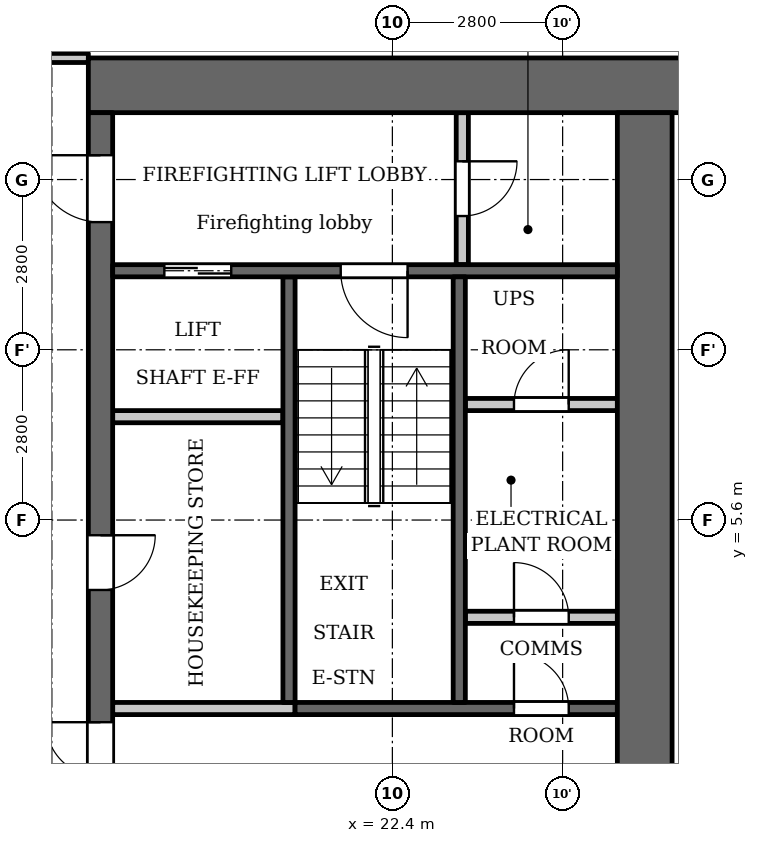
"""IFC4 building model, lengths in metres.
Left out: names, types, materials, properties, quantities, classifications, styles, units other than length and angle.
Written with IfcOpenShell. Run it as: python <this file> out.ifc"""

import sys

from ifc_helpers import new_model, si_unit, direction, frame, frame_2d, origin, place, context, subcontext, project, spatial, rectangle, extrude, element, fill, save


model = new_model("IFC4")
c1 = context("Model", 3, precision=1e-05, world=origin(), true_north=direction((0.0, 1.0)))
c2 = subcontext(c1, "Body", "Model", "MODEL_VIEW")
j1 = project(units=[si_unit("LENGTHUNIT", "METRE"), si_unit("PLANEANGLEUNIT", "RADIAN")], contexts=[c1])
p1 = place(None, origin())
s1 = spatial("IfcSite", under=j1, at=p1, CompositionType="ELEMENT")
p2 = place(p1, origin())
s2 = spatial("IfcBuilding", under=s1, at=p2, CompositionType="ELEMENT")
p3 = place(p2, frame((0.0, 0.0, 111.3)))
s3 = spatial("IfcBuildingStorey", under=s2, at=p3, CompositionType="ELEMENT", Elevation=111.3)
p4 = place(p3, frame((20.7, 2.6, 0.0), z_axis=(0.0, 0.0, 1.0), x_axis=(0.0, 1.0, 0.0)))
e1 = element("IfcWall", 1, at=p4, inside=s3, PredefinedType="SHEAR", context=c2, shape_type="SweptSolid", body=[
    extrude(rectangle(XDim=7.0, YDim=0.2, at=frame_2d((3.5, 0.0))), origin(), (0.0, 0.0, 1.0), 3.2),
])
p5 = place(p3, frame((20.8, 2.5, 0.0), z_axis=(0.0, 0.0, 1.0), x_axis=(1.0, 0.0, 0.0)))
e2 = element("IfcWall", 2, at=p5, inside=s3, PredefinedType="SHEAR", context=c2, shape_type="SweptSolid", body=[
    extrude(rectangle(XDim=5.3, YDim=0.2, at=frame_2d((2.65, 0.0))), origin(), (0.0, 0.0, 1.0), 3.2),
])
p6 = place(p5, frame((3.6, 0.0, 0.0)))
e3 = element("IfcOpeningElement", 3, at=p6, cuts=e2, PredefinedType="OPENING", context=c2, shape_type="SweptSolid", body=[
    extrude(rectangle(XDim=0.9, YDim=2.1, at=frame_2d((0.45, 1.05))), frame((0.0, 0.11, 0.0), z_axis=(0.0, -1.0, 0.0), x_axis=(1.0, 0.0, 0.0)), (0.0, 0.0, 1.0), 0.22),
])
p7 = place(p3, frame((17.4, 12.75, 0.0), z_axis=(0.0, 0.0, 1.0), x_axis=(1.0, 0.0, 0.0)))
e4 = element("IfcWall", 4, at=p7, inside=s3, PredefinedType="SHEAR", context=c2, shape_type="SweptSolid", body=[
    extrude(rectangle(XDim=10.4, YDim=0.9, at=frame_2d((5.2, 0.0))), origin(), (0.0, 0.0, 1.0), 3.2),
])
p8 = place(p3, frame((17.6, -12.3, 0.0), z_axis=(0.0, 0.0, 1.0), x_axis=(0.0, 1.0, 0.0)))
e5 = element("IfcWall", 5, at=p8, inside=s3, PredefinedType="SHEAR", context=c2, shape_type="SweptSolid", body=[
    extrude(rectangle(XDim=24.6, YDim=0.4, at=frame_2d((12.3, 0.0))), origin(), (0.0, 0.0, 1.0), 3.2),
])
p9 = place(p8, frame((6.0, 0.0, 0.0)))
e6 = element("IfcOpeningElement", 6, at=p9, cuts=e5, PredefinedType="OPENING", context=c2, shape_type="SweptSolid", body=[
    extrude(rectangle(XDim=1.1, YDim=2.1, at=frame_2d((0.55, 1.05))), frame((0.0, 0.21, 0.0), z_axis=(0.0, -1.0, 0.0), x_axis=(1.0, 0.0, 0.0)), (0.0, 0.0, 1.0), 0.42),
])
p10 = place(p8, frame((8.4, 0.0, 0.0)))
e7 = element("IfcOpeningElement", 7, at=p10, cuts=e5, PredefinedType="OPENING", context=c2, shape_type="SweptSolid", body=[
    extrude(rectangle(XDim=1.1, YDim=2.1, at=frame_2d((0.55, 1.05))), frame((0.0, 0.21, 0.0), z_axis=(0.0, -1.0, 0.0), x_axis=(1.0, 0.0, 0.0)), (0.0, 0.0, 1.0), 0.42),
])
p11 = place(p8, frame((10.8, 0.0, 0.0)))
e8 = element("IfcOpeningElement", 8, at=p11, cuts=e5, PredefinedType="OPENING", context=c2, shape_type="SweptSolid", body=[
    extrude(rectangle(XDim=1.1, YDim=2.1, at=frame_2d((0.55, 1.05))), frame((0.0, 0.21, 0.0), z_axis=(0.0, -1.0, 0.0), x_axis=(1.0, 0.0, 0.0)), (0.0, 0.0, 1.0), 0.42),
])
p12 = place(p8, frame((16.75, 0.0, 0.0)))
e9 = element("IfcOpeningElement", 9, at=p12, cuts=e5, PredefinedType="OPENING", context=c2, shape_type="SweptSolid", body=[
    extrude(rectangle(XDim=0.9, YDim=2.1, at=frame_2d((0.45, 1.05))), frame((0.0, 0.21, 0.0), z_axis=(0.0, -1.0, 0.0), x_axis=(1.0, 0.0, 0.0)), (0.0, 0.0, 1.0), 0.42),
])
p13 = place(p8, frame((22.8, 0.0, 0.0)))
e10 = element("IfcOpeningElement", 10, at=p13, cuts=e5, PredefinedType="OPENING", context=c2, shape_type="SweptSolid", body=[
    extrude(rectangle(XDim=1.1, YDim=2.1, at=frame_2d((0.55, 1.05))), frame((0.0, 0.21, 0.0), z_axis=(0.0, -1.0, 0.0), x_axis=(1.0, 0.0, 0.0)), (0.0, 0.0, 1.0), 0.42),
])
p14 = place(p8, frame((0.7, 0.0, 0.0)))
e11 = element("IfcOpeningElement", 11, at=p14, cuts=e5, PredefinedType="OPENING", context=c2, shape_type="SweptSolid", body=[
    extrude(rectangle(XDim=1.1, YDim=2.1, at=frame_2d((0.55, 1.05))), frame((0.0, 0.21, 0.0), z_axis=(0.0, -1.0, 0.0), x_axis=(1.0, 0.0, 0.0)), (0.0, 0.0, 1.0), 0.42),
])
p15 = place(p8, frame((12.775, 0.0, 0.0)))
e12 = element("IfcOpeningElement", 12, at=p15, cuts=e5, PredefinedType="OPENING", context=c2, shape_type="SweptSolid", body=[
    extrude(rectangle(XDim=1.8, YDim=2.1, at=frame_2d((0.9, 1.05))), frame((0.0, 0.21, 0.0), z_axis=(0.0, -1.0, 0.0), x_axis=(1.0, 0.0, 0.0)), (0.0, 0.0, 1.0), 0.42),
])
p16 = place(p3, frame((26.55, -12.3, 0.0), z_axis=(0.0, 0.0, 1.0), x_axis=(0.0, 1.0, 0.0)))
e13 = element("IfcWall", 13, at=p16, inside=s3, PredefinedType="SHEAR", context=c2, shape_type="SweptSolid", body=[
    extrude(rectangle(XDim=24.6, YDim=0.9, at=frame_2d((12.3, 0.0))), origin(), (0.0, 0.0, 1.0), 3.2),
])
p17 = place(p3, frame((23.55, 9.8, 0.0), z_axis=(0.0, 0.0, 1.0), x_axis=(0.0, 1.0, 0.0)))
e14 = element("IfcWall", 14, at=p17, inside=s3, PredefinedType="PARTITIONING", context=c2, shape_type="SweptSolid", body=[
    extrude(rectangle(XDim=2.5, YDim=0.2, at=frame_2d((1.25, 0.0))), origin(), (0.0, 0.0, 1.0), 3.2),
])
p18 = place(p17, frame((0.8, 0.0, 0.0)))
e15 = element("IfcOpeningElement", 15, at=p18, cuts=e14, PredefinedType="OPENING", context=c2, shape_type="SweptSolid", body=[
    extrude(rectangle(XDim=0.9, YDim=2.1, at=frame_2d((0.45, 1.05))), frame((0.0, 0.11, 0.0), z_axis=(0.0, -1.0, 0.0), x_axis=(1.0, 0.0, 0.0)), (0.0, 0.0, 1.0), 0.22),
])
p19 = place(p3, frame((23.6, 4.0, 0.0), z_axis=(0.0, 0.0, 1.0), x_axis=(1.0, 0.0, 0.0)))
e16 = element("IfcWall", 16, at=p19, inside=s3, PredefinedType="PARTITIONING", context=c2, shape_type="SweptSolid", body=[
    extrude(rectangle(XDim=2.5, YDim=0.2, at=frame_2d((1.25, 0.0))), origin(), (0.0, 0.0, 1.0), 3.2),
])
p20 = place(p19, frame((0.8, 0.0, 0.0)))
e17 = element("IfcOpeningElement", 17, at=p20, cuts=e16, PredefinedType="OPENING", context=c2, shape_type="SweptSolid", body=[
    extrude(rectangle(XDim=0.9, YDim=2.1, at=frame_2d((0.45, 1.05))), frame((0.0, 0.11, 0.0), z_axis=(0.0, -1.0, 0.0), x_axis=(1.0, 0.0, 0.0)), (0.0, 0.0, 1.0), 0.22),
])
p21 = place(p3, frame((23.6, 7.5, 0.0), z_axis=(0.0, 0.0, 1.0), x_axis=(1.0, 0.0, 0.0)))
e18 = element("IfcWall", 18, at=p21, inside=s3, PredefinedType="PARTITIONING", context=c2, shape_type="SweptSolid", body=[
    extrude(rectangle(XDim=2.5, YDim=0.2, at=frame_2d((1.25, 0.0))), origin(), (0.0, 0.0, 1.0), 3.2),
])
p22 = place(p21, frame((0.8, 0.0, 0.0)))
e19 = element("IfcOpeningElement", 19, at=p22, cuts=e18, PredefinedType="OPENING", context=c2, shape_type="SweptSolid", body=[
    extrude(rectangle(XDim=0.9, YDim=2.1, at=frame_2d((0.45, 1.05))), frame((0.0, 0.11, 0.0), z_axis=(0.0, -1.0, 0.0), x_axis=(1.0, 0.0, 0.0)), (0.0, 0.0, 1.0), 0.22),
])
p23 = place(p3, frame((17.8, 2.5, 0.0), z_axis=(0.0, 0.0, 1.0), x_axis=(1.0, 0.0, 0.0)))
e20 = element("IfcWall", 20, at=p23, inside=s3, PredefinedType="PARTITIONING", context=c2, shape_type="SweptSolid", body=[
    extrude(rectangle(XDim=3.0, YDim=0.2, at=frame_2d((1.5, 0.0))), origin(), (0.0, 0.0, 1.0), 3.2),
])
p24 = place(p3, frame((17.8, 7.3, 0.0), z_axis=(0.0, 0.0, 1.0), x_axis=(1.0, 0.0, 0.0)))
e21 = element("IfcWall", 21, at=p24, inside=s3, PredefinedType="PARTITIONING", context=c2, shape_type="SweptSolid", body=[
    extrude(rectangle(XDim=2.8, YDim=0.2, at=frame_2d((1.4, 0.0))), origin(), (0.0, 0.0, 1.0), 3.2),
])
p25 = place(p3, frame((17.8, 9.7, 0.0), z_axis=(0.0, 0.0, 1.0), x_axis=(1.0, 0.0, 0.0)))
e22 = element("IfcWall", 22, at=p25, inside=s3, PredefinedType="SHEAR", context=c2, shape_type="SweptSolid", body=[
    extrude(rectangle(XDim=8.3, YDim=0.2, at=frame_2d((4.15, 0.0))), origin(), (0.0, 0.0, 1.0), 3.2),
])
p26 = place(p25, frame((0.85, 0.0, 0.0)))
e23 = element("IfcOpeningElement", 23, at=p26, cuts=e22, PredefinedType="OPENING", context=c2, shape_type="SweptSolid", body=[
    extrude(rectangle(XDim=1.1, YDim=2.1, at=frame_2d((0.55, 1.05))), frame((0.0, 0.11, 0.0), z_axis=(0.0, -1.0, 0.0), x_axis=(1.0, 0.0, 0.0)), (0.0, 0.0, 1.0), 0.22),
])
p27 = place(p25, frame((3.75, 0.0, 0.0)))
e24 = element("IfcOpeningElement", 24, at=p27, cuts=e22, PredefinedType="OPENING", context=c2, shape_type="SweptSolid", body=[
    extrude(rectangle(XDim=1.1, YDim=2.1, at=frame_2d((0.55, 1.05))), frame((0.0, 0.11, 0.0), z_axis=(0.0, -1.0, 0.0), x_axis=(1.0, 0.0, 0.0)), (0.0, 0.0, 1.0), 0.22),
])
p28 = place(p3, frame((23.5, 2.6, 0.0), z_axis=(0.0, 0.0, 1.0), x_axis=(0.0, 1.0, 0.0)))
e25 = element("IfcWall", 25, at=p28, inside=s3, PredefinedType="SHEAR", context=c2, shape_type="SweptSolid", body=[
    extrude(rectangle(XDim=7.0, YDim=0.2, at=frame_2d((3.5, 0.0))), origin(), (0.0, 0.0, 1.0), 3.2),
])
p29 = place(p3, frame((-17.4, 13.2, 0.0), z_axis=(0.0, 0.0, 1.0), x_axis=(1.0, 0.0, 0.0)))
e26 = element("IfcWall", 26, at=p29, inside=s3, PredefinedType="PARTITIONING", context=c2, shape_type="SweptSolid", body=[
    extrude(rectangle(XDim=34.8, YDim=0.15, at=frame_2d((17.4, 0.0))), origin(), (0.0, 0.0, 1.0), 3.2),
])
p30 = place(p29, frame((0.75, 0.0, 0.0)))
e27 = element("IfcOpeningElement", 27, at=p30, cuts=e26, PredefinedType="OPENING", context=c2, shape_type="SweptSolid", body=[
    extrude(rectangle(XDim=1.0, YDim=2.1, at=frame_2d((0.5, 1.05))), frame((0.0, 0.085, 0.0), z_axis=(0.0, -1.0, 0.0), x_axis=(1.0, 0.0, 0.0)), (0.0, 0.0, 1.0), 0.17),
])
p31 = place(p29, frame((33.15, 0.0, 0.0)))
e28 = element("IfcOpeningElement", 28, at=p31, cuts=e26, PredefinedType="OPENING", context=c2, shape_type="SweptSolid", body=[
    extrude(rectangle(XDim=1.0, YDim=2.1, at=frame_2d((0.5, 1.05))), frame((0.0, 0.085, 0.0), z_axis=(0.0, -1.0, 0.0), x_axis=(1.0, 0.0, 0.0)), (0.0, 0.0, 1.0), 0.17),
])
p32 = place(p29, frame((6.85, 0.0, 0.0)))
e29 = element("IfcOpeningElement", 29, at=p32, cuts=e26, PredefinedType="OPENING", context=c2, shape_type="SweptSolid", body=[
    extrude(rectangle(XDim=1.0, YDim=2.1, at=frame_2d((0.5, 1.05))), frame((0.0, 0.085, 0.0), z_axis=(0.0, -1.0, 0.0), x_axis=(1.0, 0.0, 0.0)), (0.0, 0.0, 1.0), 0.17),
])
p33 = place(p29, frame((12.45, 0.0, 0.0)))
e30 = element("IfcOpeningElement", 30, at=p33, cuts=e26, PredefinedType="OPENING", context=c2, shape_type="SweptSolid", body=[
    extrude(rectangle(XDim=1.0, YDim=2.1, at=frame_2d((0.5, 1.05))), frame((0.0, 0.085, 0.0), z_axis=(0.0, -1.0, 0.0), x_axis=(1.0, 0.0, 0.0)), (0.0, 0.0, 1.0), 0.17),
])
p34 = place(p29, frame((29.25, 0.0, 0.0)))
e31 = element("IfcOpeningElement", 31, at=p34, cuts=e26, PredefinedType="OPENING", context=c2, shape_type="SweptSolid", body=[
    extrude(rectangle(XDim=1.0, YDim=2.1, at=frame_2d((0.5, 1.05))), frame((0.0, 0.085, 0.0), z_axis=(0.0, -1.0, 0.0), x_axis=(1.0, 0.0, 0.0)), (0.0, 0.0, 1.0), 0.17),
])
p35 = place(p12, origin())
e32 = element("IfcDoor", 32, at=p35, inside=s3, OperationType="SINGLE_SWING_RIGHT", PredefinedType="DOOR", context=c2, shape_type="SweptSolid", body=[
    extrude(rectangle(XDim=0.9, YDim=2.1, at=frame_2d((0.45, 1.05))), frame((0.0, 0.025, 0.0), z_axis=(0.0, -1.0, 0.0), x_axis=(1.0, 0.0, 0.0)), (0.0, 0.0, 1.0), 0.05),
])
fill(e9, e32)
p36 = place(p26, origin())
e33 = element("IfcDoor", 33, at=p36, inside=s3, OperationType="DOUBLE_DOOR_SLIDING", PredefinedType="DOOR", context=c2, shape_type="SweptSolid", body=[
    extrude(rectangle(XDim=1.1, YDim=2.1, at=frame_2d((0.55, 1.05))), frame((0.0, 0.025, 0.0), z_axis=(0.0, -1.0, 0.0), x_axis=(1.0, 0.0, 0.0)), (0.0, 0.0, 1.0), 0.05),
])
fill(e23, e33)
p37 = place(p13, origin())
e34 = element("IfcDoor", 34, at=p37, inside=s3, OperationType="SINGLE_SWING_LEFT", PredefinedType="DOOR", context=c2, shape_type="SweptSolid", body=[
    extrude(rectangle(XDim=1.1, YDim=2.1, at=frame_2d((0.55, 1.05))), frame((0.0, 0.025, 0.0), z_axis=(0.0, -1.0, 0.0), x_axis=(1.0, 0.0, 0.0)), (0.0, 0.0, 1.0), 0.05),
])
fill(e10, e34)
p38 = place(p18, origin())
e35 = element("IfcDoor", 35, at=p38, inside=s3, OperationType="SINGLE_SWING_RIGHT", PredefinedType="DOOR", context=c2, shape_type="SweptSolid", body=[
    extrude(rectangle(XDim=0.9, YDim=2.1, at=frame_2d((0.45, 1.05))), frame((0.0, 0.025, 0.0), z_axis=(0.0, -1.0, 0.0), x_axis=(1.0, 0.0, 0.0)), (0.0, 0.0, 1.0), 0.05),
])
fill(e15, e35)
p39 = place(p27, origin())
e36 = element("IfcDoor", 36, at=p39, inside=s3, OperationType="SINGLE_SWING_RIGHT", PredefinedType="DOOR", context=c2, shape_type="SweptSolid", body=[
    extrude(rectangle(XDim=1.1, YDim=2.1, at=frame_2d((0.55, 1.05))), frame((0.0, 0.025, 0.0), z_axis=(0.0, -1.0, 0.0), x_axis=(1.0, 0.0, 0.0)), (0.0, 0.0, 1.0), 0.05),
])
fill(e24, e36)
p40 = place(p15, origin())
e37 = element("IfcDoor", 37, at=p40, inside=s3, OperationType="DOUBLE_DOOR_SINGLE_SWING", PredefinedType="DOOR", context=c2, shape_type="SweptSolid", body=[
    extrude(rectangle(XDim=1.8, YDim=2.1, at=frame_2d((0.9, 1.05))), frame((0.0, 0.025, 0.0), z_axis=(0.0, -1.0, 0.0), x_axis=(1.0, 0.0, 0.0)), (0.0, 0.0, 1.0), 0.05),
])
fill(e12, e37)
p41 = place(p20, origin())
e38 = element("IfcDoor", 38, at=p41, inside=s3, OperationType="SINGLE_SWING_RIGHT", PredefinedType="DOOR", context=c2, shape_type="SweptSolid", body=[
    extrude(rectangle(XDim=0.9, YDim=2.1, at=frame_2d((0.45, 1.05))), frame((0.0, 0.025, 0.0), z_axis=(0.0, -1.0, 0.0), x_axis=(1.0, 0.0, 0.0)), (0.0, 0.0, 1.0), 0.05),
])
fill(e17, e38)
p42 = place(p22, origin())
e39 = element("IfcDoor", 39, at=p42, inside=s3, OperationType="SINGLE_SWING_LEFT", PredefinedType="DOOR", context=c2, shape_type="SweptSolid", body=[
    extrude(rectangle(XDim=0.9, YDim=2.1, at=frame_2d((0.45, 1.05))), frame((0.0, 0.025, 0.0), z_axis=(0.0, -1.0, 0.0), x_axis=(1.0, 0.0, 0.0)), (0.0, 0.0, 1.0), 0.05),
])
fill(e19, e39)
p43 = place(p6, origin())
e40 = element("IfcDoor", 40, at=p43, inside=s3, OperationType="SINGLE_SWING_RIGHT", PredefinedType="DOOR", context=c2, shape_type="SweptSolid", body=[
    extrude(rectangle(XDim=0.9, YDim=2.1, at=frame_2d((0.45, 1.05))), frame((0.0, 0.025, 0.0), z_axis=(0.0, -1.0, 0.0), x_axis=(1.0, 0.0, 0.0)), (0.0, 0.0, 1.0), 0.05),
])
fill(e3, e40)
save(model, sys.argv[1])
